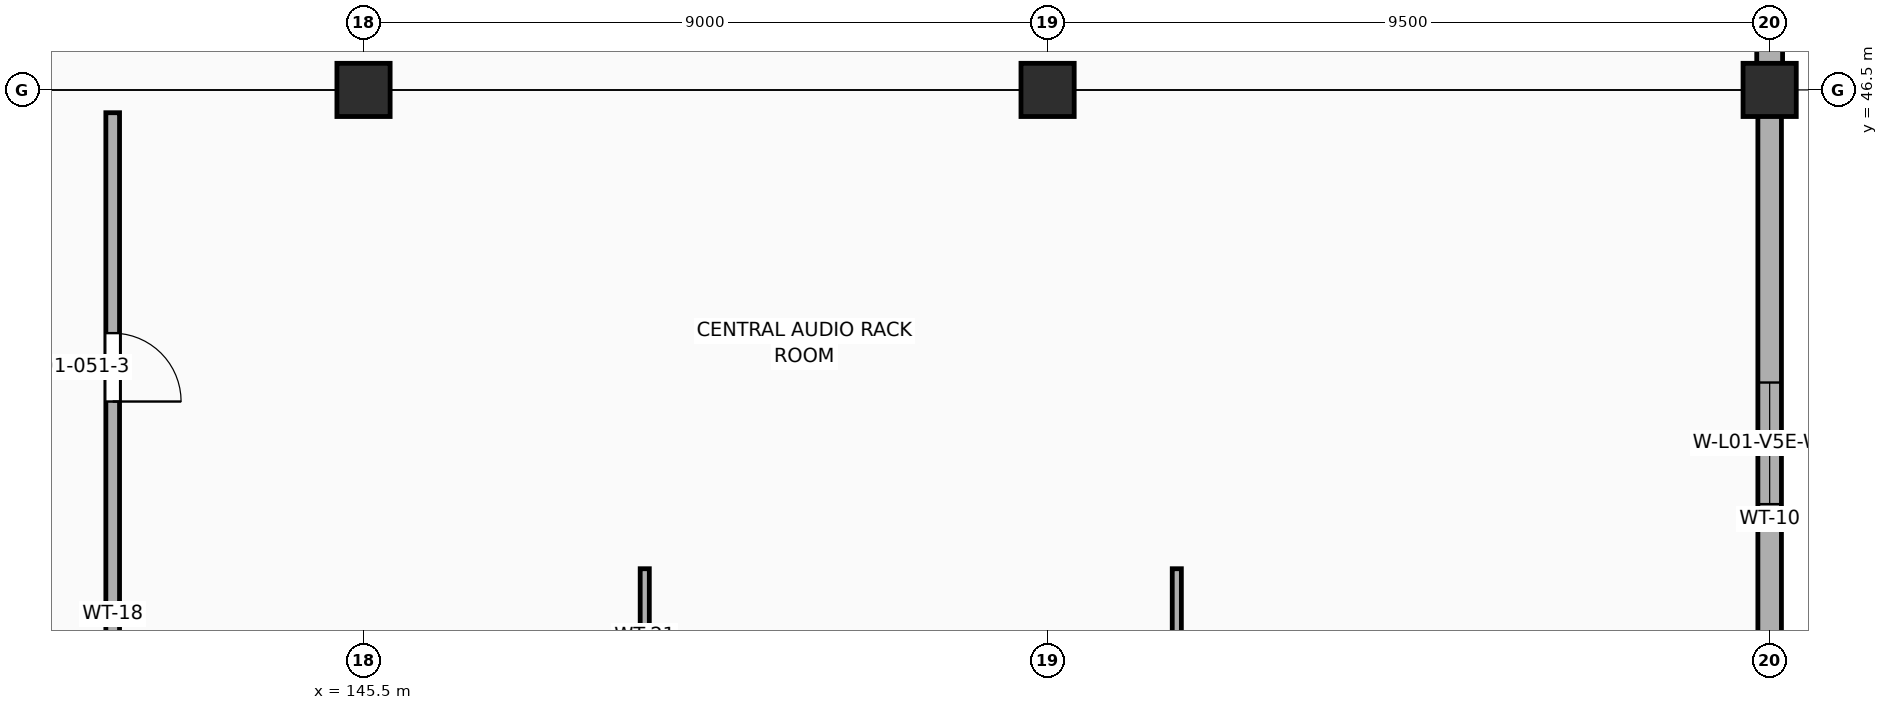
"""IFC4 building model, lengths in metres.
Left out: names, types, materials, properties, quantities, classifications, styles, units other than length and angle.
Written with IfcOpenShell. Run it as: python <this file> out.ifc"""

import sys

from ifc_helpers import new_model, si_unit, direction, frame, frame_2d, origin, origin_2d, place, context, subcontext, project, spatial, rectangle, extrude, element, fill, save


model = new_model("IFC4")
c1 = context("Model", 3, precision=1e-05, world=origin(), true_north=direction((0.0, 1.0)))
c2 = subcontext(c1, "Body", "Model", "MODEL_VIEW")
j1 = project(units=[si_unit("LENGTHUNIT", "METRE"), si_unit("PLANEANGLEUNIT", "RADIAN")], contexts=[c1])
p1 = place(None, origin())
s1 = spatial("IfcSite", under=j1, at=p1, CompositionType="ELEMENT")
p2 = place(p1, origin())
s2 = spatial("IfcBuilding", under=s1, at=p2, CompositionType="ELEMENT")
p3 = place(p2, frame((0.0, 0.0, 5.4)))
s3 = spatial("IfcBuildingStorey", under=s2, at=p3, CompositionType="ELEMENT", Elevation=5.4)
for number, where, z_axis, x_axis in (
    (1, (145.5, 46.5, 0.0), (0.0, 0.0, 1.0), (1.0, 0.0, 0.0)),
    (2, (154.5, 46.5, 0.0), (0.0, 0.0, 1.0), (1.0, 0.0, 0.0)),
    (3, (164.0, 46.5, 0.0), (0.0, 0.0, 1.0), (1.0, 0.0, 0.0)),
):
    element("IfcColumn", number, at=place(p3, frame(where, z_axis=z_axis, x_axis=x_axis)), inside=s3, PredefinedType="COLUMN", context=c2, shape_type="SweptSolid", body=[
        extrude(rectangle(XDim=0.7, YDim=0.7, at=origin_2d()), origin(), (0.0, 0.0, 1.0), 4.7),
    ])
p4 = place(p3, frame((164.0, 0.0, 0.0), z_axis=(0.0, 0.0, 1.0), x_axis=(0.0, 1.0, 0.0)))
e4 = element("IfcWall", 4, at=p4, inside=s3, PredefinedType="STANDARD", context=c2, shape_type="SweptSolid", body=[
    extrude(rectangle(XDim=46.5, YDim=0.31, at=frame_2d((23.25, 0.0))), origin(), (0.0, 0.0, 1.0), 4.198),
])
p5 = place(p4, frame((3.85, 0.0, 1.0)))
e5 = element("IfcOpeningElement", 5, at=p5, cuts=e4, PredefinedType="OPENING", context=c2, shape_type="SweptSolid", body=[
    extrude(rectangle(XDim=1.6, YDim=2.2, at=frame_2d((0.8, 1.1))), frame((0.0, 0.167, 0.0), z_axis=(0.0, -1.0, 0.0), x_axis=(1.0, 0.0, 0.0)), (0.0, 0.0, 1.0), 0.334),
])
p6 = place(p4, frame((13.15, 0.0, 1.0)))
e6 = element("IfcOpeningElement", 6, at=p6, cuts=e4, PredefinedType="OPENING", context=c2, shape_type="SweptSolid", body=[
    extrude(rectangle(XDim=1.6, YDim=2.2, at=frame_2d((0.8, 1.1))), frame((0.0, 0.167, 0.0), z_axis=(0.0, -1.0, 0.0), x_axis=(1.0, 0.0, 0.0)), (0.0, 0.0, 1.0), 0.334),
])
p7 = place(p4, frame((22.45, 0.0, 1.0)))
e7 = element("IfcOpeningElement", 7, at=p7, cuts=e4, PredefinedType="OPENING", context=c2, shape_type="SweptSolid", body=[
    extrude(rectangle(XDim=1.6, YDim=2.2, at=frame_2d((0.8, 1.1))), frame((0.0, 0.167, 0.0), z_axis=(0.0, -1.0, 0.0), x_axis=(1.0, 0.0, 0.0)), (0.0, 0.0, 1.0), 0.334),
])
p8 = place(p4, frame((31.75, 0.0, 1.0)))
e8 = element("IfcOpeningElement", 8, at=p8, cuts=e4, PredefinedType="OPENING", context=c2, shape_type="SweptSolid", body=[
    extrude(rectangle(XDim=1.6, YDim=2.2, at=frame_2d((0.8, 1.1))), frame((0.0, 0.167, 0.0), z_axis=(0.0, -1.0, 0.0), x_axis=(1.0, 0.0, 0.0)), (0.0, 0.0, 1.0), 0.334),
])
p9 = place(p4, frame((41.05, 0.0, 1.0)))
e9 = element("IfcOpeningElement", 9, at=p9, cuts=e4, PredefinedType="OPENING", context=c2, shape_type="SweptSolid", body=[
    extrude(rectangle(XDim=1.6, YDim=2.2, at=frame_2d((0.8, 1.1))), frame((0.0, 0.167, 0.0), z_axis=(0.0, -1.0, 0.0), x_axis=(1.0, 0.0, 0.0)), (0.0, 0.0, 1.0), 0.334),
])
p10 = place(p3, frame((164.0, 46.5, 0.0), z_axis=(0.0, 0.0, 1.0), x_axis=(0.0, 1.0, 0.0)))
e10 = element("IfcWall", 10, at=p10, inside=s3, PredefinedType="STANDARD", context=c2, shape_type="SweptSolid", body=[
    extrude(rectangle(XDim=67.5, YDim=0.34, at=frame_2d((33.75, 0.0))), origin(), (0.0, 0.0, 1.0), 3.84),
])
p11 = place(p10, frame((4.325, 0.0, 2.28)))
e11 = element("IfcOpeningElement", 11, at=p11, cuts=e10, PredefinedType="OPENING", context=c2, shape_type="SweptSolid", body=[
    extrude(rectangle(XDim=2.6, YDim=1.4, at=frame_2d((1.3, 0.7))), frame((0.0, 0.182, 0.0), z_axis=(0.0, -1.0, 0.0), x_axis=(1.0, 0.0, 0.0)), (0.0, 0.0, 1.0), 0.364),
])
p12 = place(p10, frame((15.575, 0.0, 2.28)))
e12 = element("IfcOpeningElement", 12, at=p12, cuts=e10, PredefinedType="OPENING", context=c2, shape_type="SweptSolid", body=[
    extrude(rectangle(XDim=2.6, YDim=1.4, at=frame_2d((1.3, 0.7))), frame((0.0, 0.182, 0.0), z_axis=(0.0, -1.0, 0.0), x_axis=(1.0, 0.0, 0.0)), (0.0, 0.0, 1.0), 0.364),
])
p13 = place(p10, frame((26.825, 0.0, 2.28)))
e13 = element("IfcOpeningElement", 13, at=p13, cuts=e10, PredefinedType="OPENING", context=c2, shape_type="SweptSolid", body=[
    extrude(rectangle(XDim=2.6, YDim=1.4, at=frame_2d((1.3, 0.7))), frame((0.0, 0.182, 0.0), z_axis=(0.0, -1.0, 0.0), x_axis=(1.0, 0.0, 0.0)), (0.0, 0.0, 1.0), 0.364),
])
p14 = place(p10, frame((38.075, 0.0, 2.28)))
e14 = element("IfcOpeningElement", 14, at=p14, cuts=e10, PredefinedType="OPENING", context=c2, shape_type="SweptSolid", body=[
    extrude(rectangle(XDim=2.6, YDim=1.4, at=frame_2d((1.3, 0.7))), frame((0.0, 0.182, 0.0), z_axis=(0.0, -1.0, 0.0), x_axis=(1.0, 0.0, 0.0)), (0.0, 0.0, 1.0), 0.364),
])
p15 = place(p10, frame((49.325, 0.0, 2.28)))
e15 = element("IfcOpeningElement", 15, at=p15, cuts=e10, PredefinedType="OPENING", context=c2, shape_type="SweptSolid", body=[
    extrude(rectangle(XDim=2.6, YDim=1.4, at=frame_2d((1.3, 0.7))), frame((0.0, 0.182, 0.0), z_axis=(0.0, -1.0, 0.0), x_axis=(1.0, 0.0, 0.0)), (0.0, 0.0, 1.0), 0.364),
])
p16 = place(p10, frame((60.575, 0.0, 2.28)))
e16 = element("IfcOpeningElement", 16, at=p16, cuts=e10, PredefinedType="OPENING", context=c2, shape_type="SweptSolid", body=[
    extrude(rectangle(XDim=2.6, YDim=1.4, at=frame_2d((1.3, 0.7))), frame((0.0, 0.182, 0.0), z_axis=(0.0, -1.0, 0.0), x_axis=(1.0, 0.0, 0.0)), (0.0, 0.0, 1.0), 0.364),
])
p17 = place(p3, frame((142.2, 19.9, 0.0), z_axis=(0.0, 0.0, 1.0), x_axis=(0.0, 1.0, 0.0)))
e17 = element("IfcWall", 17, at=p17, inside=s3, PredefinedType="PARTITIONING", context=c2, shape_type="SweptSolid", body=[
    extrude(rectangle(XDim=26.3, YDim=0.18, at=frame_2d((13.15, 0.0))), origin(), (0.0, 0.0, 1.0), 4.148),
])
p18 = place(p17, frame((6.0, 0.0, 0.0)))
e18 = element("IfcOpeningElement", 18, at=p18, cuts=e17, PredefinedType="OPENING", context=c2, shape_type="SweptSolid", body=[
    extrude(rectangle(XDim=1.0, YDim=2.15, at=frame_2d((0.5, 1.075))), frame((0.0, 0.102, 0.0), z_axis=(0.0, -1.0, 0.0), x_axis=(1.0, 0.0, 0.0)), (0.0, 0.0, 1.0), 0.204),
])
p19 = place(p17, frame((16.0, 0.0, 0.0)))
e19 = element("IfcOpeningElement", 19, at=p19, cuts=e17, PredefinedType="OPENING", context=c2, shape_type="SweptSolid", body=[
    extrude(rectangle(XDim=0.9, YDim=2.15, at=frame_2d((0.45, 1.075))), frame((0.0, 0.102, 0.0), z_axis=(0.0, -1.0, 0.0), x_axis=(1.0, 0.0, 0.0)), (0.0, 0.0, 1.0), 0.204),
])
p20 = place(p17, frame((22.5, 0.0, 0.0)))
e20 = element("IfcOpeningElement", 20, at=p20, cuts=e17, PredefinedType="OPENING", context=c2, shape_type="SweptSolid", body=[
    extrude(rectangle(XDim=0.9, YDim=2.1, at=frame_2d((0.45, 1.05))), frame((0.0, 0.102, 0.0), z_axis=(0.0, -1.0, 0.0), x_axis=(1.0, 0.0, 0.0)), (0.0, 0.0, 1.0), 0.204),
])
p21 = place(p3, frame((149.2, 34.3, 0.0), z_axis=(0.0, 0.0, 1.0), x_axis=(0.0, 1.0, 0.0)))
e21 = element("IfcWall", 21, at=p21, inside=s3, PredefinedType="PARTITIONING", context=c2, shape_type="SweptSolid", body=[
    extrude(rectangle(XDim=5.9, YDim=0.12, at=frame_2d((2.95, 0.0))), origin(), (0.0, 0.0, 1.0), 4.198),
])
p22 = place(p21, frame((2.0, 0.0, 0.0)))
e22 = element("IfcOpeningElement", 22, at=p22, cuts=e21, PredefinedType="OPENING", context=c2, shape_type="SweptSolid", body=[
    extrude(rectangle(XDim=0.9, YDim=2.15, at=frame_2d((0.45, 1.075))), frame((0.0, 0.072, 0.0), z_axis=(0.0, -1.0, 0.0), x_axis=(1.0, 0.0, 0.0)), (0.0, 0.0, 1.0), 0.144),
])
p23 = place(p3, frame((156.2, 34.3, 0.0), z_axis=(0.0, 0.0, 1.0), x_axis=(0.0, 1.0, 0.0)))
e23 = element("IfcWall", 23, at=p23, inside=s3, PredefinedType="PARTITIONING", context=c2, shape_type="SweptSolid", body=[
    extrude(rectangle(XDim=5.9, YDim=0.12, at=frame_2d((2.95, 0.0))), origin(), (0.0, 0.0, 1.0), 3.85),
])
p24 = place(p23, frame((2.0, 0.0, 0.0)))
e24 = element("IfcOpeningElement", 24, at=p24, cuts=e23, PredefinedType="OPENING", context=c2, shape_type="SweptSolid", body=[
    extrude(rectangle(XDim=0.95, YDim=2.15, at=frame_2d((0.475, 1.075))), frame((0.0, 0.072, 0.0), z_axis=(0.0, -1.0, 0.0), x_axis=(1.0, 0.0, 0.0)), (0.0, 0.0, 1.0), 0.144),
])
p25 = place(p9, origin())
e25 = element("IfcWindow", 25, at=p25, inside=s3, PartitioningType="SINGLE_PANEL", PredefinedType="WINDOW", context=c2, shape_type="SweptSolid", body=[
    extrude(rectangle(XDim=1.6, YDim=2.2, at=frame_2d((0.8, 1.1))), frame((0.0, 0.03, 0.0), z_axis=(0.0, -1.0, 0.0), x_axis=(1.0, 0.0, 0.0)), (0.0, 0.0, 1.0), 0.06),
])
fill(e9, e25)
p26 = place(p20, frame((0.9, 0.0, 0.0), z_axis=(0.0, 0.0, 1.0), x_axis=(-1.0, 0.0, 0.0)))
e26 = element("IfcDoor", 26, at=p26, inside=s3, OperationType="SINGLE_SWING_LEFT", PredefinedType="DOOR", context=c2, shape_type="SweptSolid", body=[
    extrude(rectangle(XDim=0.9, YDim=2.1, at=frame_2d((0.45, 1.05))), frame((0.0, 0.025, 0.0), z_axis=(0.0, -1.0, 0.0), x_axis=(1.0, 0.0, 0.0)), (0.0, 0.0, 1.0), 0.05),
])
fill(e20, e26)
save(model, sys.argv[1])
